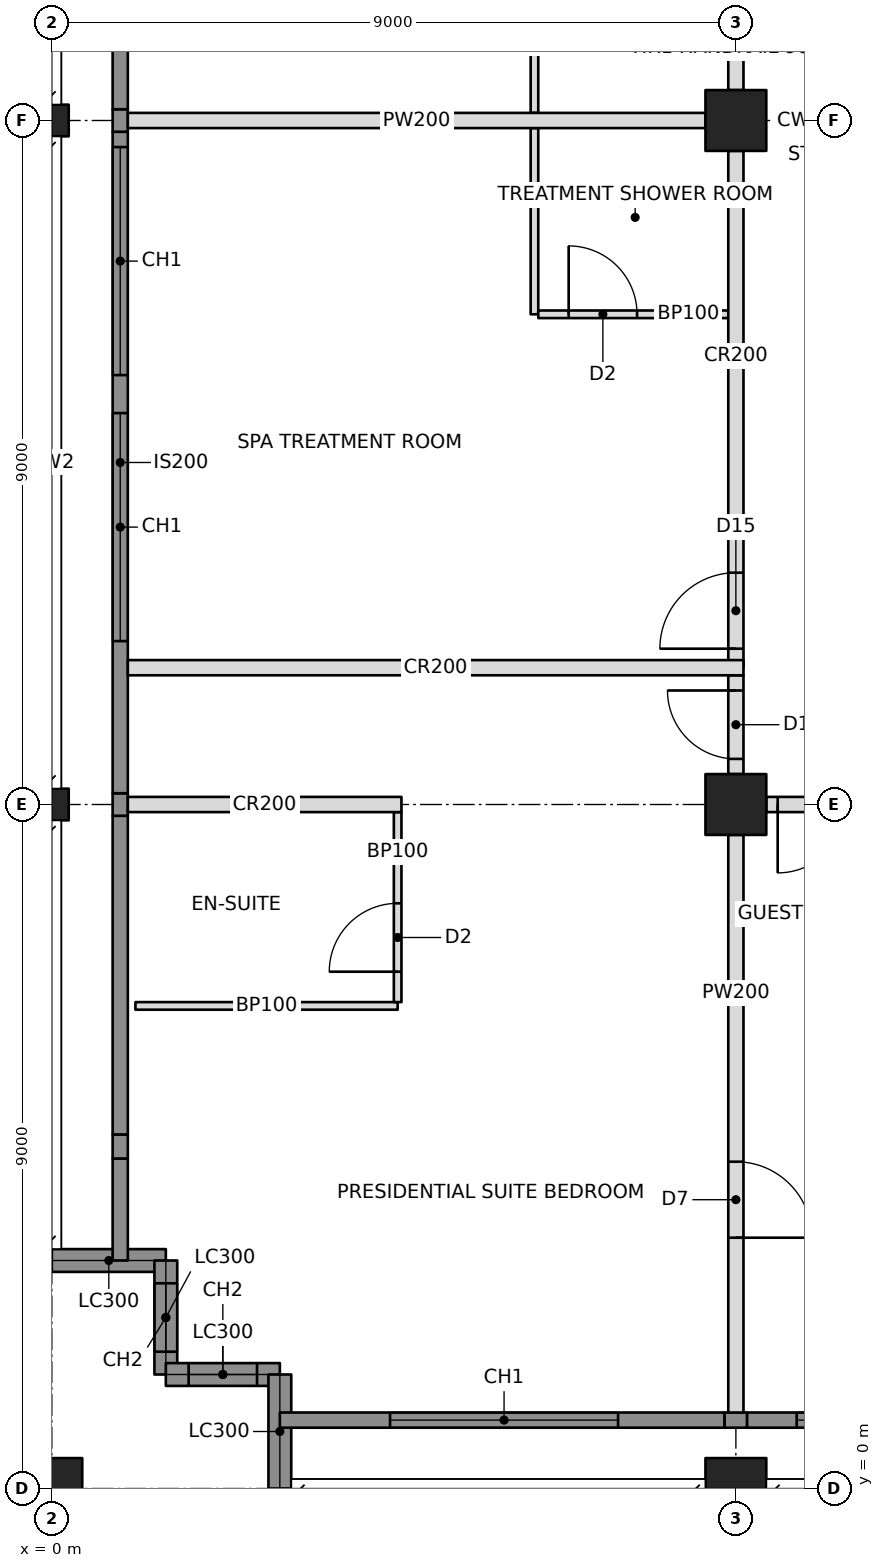
"""IFC4 building model, lengths in metres.
Left out: names, types, materials, properties, quantities, classifications, styles, units other than length and angle.
Written with IfcOpenShell. Run it as: python <this file> out.ifc"""

import sys

from ifc_helpers import new_model, si_unit, direction, frame, frame_2d, origin, origin_with_axes, origin_2d, place, context, subcontext, project, spatial, rectangle, hollow_rectangle, i_section, extrude, element, fill, save


model = new_model("IFC4")
c1 = context("Model", 3, precision=1e-05, world=origin(), true_north=direction((0.0, 1.0)))
c2 = subcontext(c1, "Body", "Model", "MODEL_VIEW")
j1 = project(units=[si_unit("LENGTHUNIT", "METRE"), si_unit("PLANEANGLEUNIT", "RADIAN")], contexts=[c1])
p1 = place(None, origin())
s1 = spatial("IfcSite", under=j1, at=p1, CompositionType="ELEMENT")
p2 = place(p1, origin())
s2 = spatial("IfcBuilding", under=s1, at=p2, CompositionType="ELEMENT")
p3 = place(p2, frame((0.0, 0.0, 266.2)))
s3 = spatial("IfcBuildingStorey", under=s2, at=p3, CompositionType="ELEMENT", Elevation=266.2)
p4 = place(p3, origin_with_axes())
e1 = element("IfcColumn", 1, at=p4, inside=s3, PredefinedType="COLUMN", context=c2, shape_type="SweptSolid", body=[
    extrude(hollow_rectangle(XDim=0.8, YDim=0.8, WallThickness=0.032, at=origin_2d()), origin(), (0.0, 0.0, 1.0), 3.6),
])
for number, where, z_axis, x_axis in (
    (2, (0.0, 9.0, 0.0), (0.0, 0.0, 1.0), (0.0, 1.0, 0.0)),
    (3, (0.0, 18.0, 0.0), (0.0, 0.0, 1.0), (0.0, 1.0, 0.0)),
):
    element("IfcColumn", number, at=place(p3, frame(where, z_axis=z_axis, x_axis=x_axis)), inside=s3, PredefinedType="COLUMN", context=c2, shape_type="SweptSolid", body=[
        extrude(i_section(OverallWidth=0.417, OverallDepth=0.445, WebThickness=0.039, FlangeThickness=0.063, at=origin_2d()), origin(), (0.0, 0.0, 1.0), 3.6),
    ])
for number, where, z_axis, x_axis in (
    (4, (9.0, 0.0, 0.0), (0.0, 0.0, 1.0), (1.0, 0.0, 0.0)),
    (5, (9.0, 9.0, 0.0), (0.0, 0.0, 1.0), (1.0, 0.0, 0.0)),
    (6, (9.0, 18.0, 0.0), (0.0, 0.0, 1.0), (1.0, 0.0, 0.0)),
):
    element("IfcColumn", number, at=place(p3, frame(where, z_axis=z_axis, x_axis=x_axis)), inside=s3, PredefinedType="COLUMN", context=c2, shape_type="SweptSolid", body=[
        extrude(hollow_rectangle(XDim=0.8, YDim=0.8, WallThickness=0.032, at=origin_2d()), origin(), (0.0, 0.0, 1.0), 3.6),
    ])
p5 = place(p3, frame((0.0, 3.0, 0.0), z_axis=(0.0, 0.0, 1.0), x_axis=(1.0, 0.0, 0.0)))
e7 = element("IfcWall", 7, at=p5, inside=s3, PredefinedType="SOLIDWALL", context=c2, shape_type="SweptSolid", body=[
    extrude(rectangle(XDim=1.5, YDim=0.3, at=frame_2d((0.75, 0.0))), origin(), (0.0, 0.0, 1.0), 2.57),
])
p6 = place(p3, frame((1.5, 3.0, 0.0), z_axis=(0.0, 0.0, 1.0), x_axis=(0.0, -1.0, 0.0)))
e8 = element("IfcWall", 8, at=p6, inside=s3, PredefinedType="SOLIDWALL", context=c2, shape_type="SweptSolid", body=[
    extrude(rectangle(XDim=1.5, YDim=0.3, at=frame_2d((0.75, 0.0))), origin(), (0.0, 0.0, 1.0), 3.35),
])
p7 = place(p6, frame((0.3, 0.0, 0.6)))
e9 = element("IfcOpeningElement", 9, at=p7, cuts=e8, PredefinedType="OPENING", context=c2, shape_type="SweptSolid", body=[
    extrude(rectangle(XDim=0.9, YDim=2.2, at=frame_2d((0.45, 1.1))), frame((0.0, 0.16, 0.0), z_axis=(0.0, -1.0, 0.0), x_axis=(1.0, 0.0, 0.0)), (0.0, 0.0, 1.0), 0.32),
])
p8 = place(p3, frame((1.5, 1.5, 0.0), z_axis=(0.0, 0.0, 1.0), x_axis=(1.0, 0.0, 0.0)))
e10 = element("IfcWall", 10, at=p8, inside=s3, PredefinedType="SOLIDWALL", context=c2, shape_type="SweptSolid", body=[
    extrude(rectangle(XDim=1.5, YDim=0.3, at=frame_2d((0.75, 0.0))), origin(), (0.0, 0.0, 1.0), 3.35),
])
p9 = place(p8, frame((0.3, 0.0, 0.6)))
e11 = element("IfcOpeningElement", 11, at=p9, cuts=e10, PredefinedType="OPENING", context=c2, shape_type="SweptSolid", body=[
    extrude(rectangle(XDim=0.9, YDim=2.2, at=frame_2d((0.45, 1.1))), frame((0.0, 0.16, 0.0), z_axis=(0.0, -1.0, 0.0), x_axis=(1.0, 0.0, 0.0)), (0.0, 0.0, 1.0), 0.32),
])
p10 = place(p3, frame((3.0, 1.5, 0.0), z_axis=(0.0, 0.0, 1.0), x_axis=(0.0, -1.0, 0.0)))
e12 = element("IfcWall", 12, at=p10, inside=s3, PredefinedType="SOLIDWALL", context=c2, shape_type="SweptSolid", body=[
    extrude(rectangle(XDim=1.5, YDim=0.3, at=frame_2d((0.75, 0.0))), origin(), (0.0, 0.0, 1.0), 2.57),
])
p11 = place(p3, frame((3.0, 0.9, 0.0), z_axis=(0.0, 0.0, 1.0), x_axis=(1.0, 0.0, 0.0)))
e13 = element("IfcWall", 13, at=p11, inside=s3, PredefinedType="SOLIDWALL", context=c2, shape_type="SweptSolid", body=[
    extrude(rectangle(XDim=5.852, YDim=0.2, at=frame_2d((2.926, 0.0))), origin(), (0.0, 0.0, 1.0), 3.35),
])
p12 = place(p11, frame((1.45, 0.0, 0.6)))
e14 = element("IfcOpeningElement", 14, at=p12, cuts=e13, PredefinedType="OPENING", context=c2, shape_type="SweptSolid", body=[
    extrude(rectangle(XDim=3.0, YDim=2.2, at=frame_2d((1.5, 1.1))), frame((0.0, 0.11, 0.0), z_axis=(0.0, -1.0, 0.0), x_axis=(1.0, 0.0, 0.0)), (0.0, 0.0, 1.0), 0.22),
])
p13 = place(p3, frame((0.9, 3.0, 0.0), z_axis=(0.0, 0.0, 1.0), x_axis=(0.0, 1.0, 0.0)))
e15 = element("IfcWall", 15, at=p13, inside=s3, PredefinedType="SOLIDWALL", context=c2, shape_type="SweptSolid", body=[
    extrude(rectangle(XDim=1.342, YDim=0.2, at=frame_2d((0.671, 0.0))), origin(), (0.0, 0.0, 1.0), 3.35),
])
p14 = place(p3, frame((1.0, 9.0, 0.0), z_axis=(0.0, 0.0, 1.0), x_axis=(1.0, 0.0, 0.0)))
e16 = element("IfcWall", 16, at=p14, inside=s3, PredefinedType="PARTITIONING", context=c2, shape_type="SweptSolid", body=[
    extrude(rectangle(XDim=3.6, YDim=0.2, at=frame_2d((1.8, 0.0))), origin(), (0.0, 0.0, 1.0), 2.491),
])
p15 = place(p3, frame((9.4, 9.0, 0.0), z_axis=(0.0, 0.0, 1.0), x_axis=(1.0, 0.0, 0.0)))
e17 = element("IfcWall", 17, at=p15, inside=s3, PredefinedType="PARTITIONING", context=c2, shape_type="SweptSolid", body=[
    extrude(rectangle(XDim=8.2, YDim=0.2, at=frame_2d((4.1, 0.0))), origin(), (0.0, 0.0, 1.0), 2.491),
])
p16 = place(p15, frame((0.15, 0.0, 0.0)))
e18 = element("IfcOpeningElement", 18, at=p16, cuts=e17, PredefinedType="OPENING", context=c2, shape_type="SweptSolid", body=[
    extrude(rectangle(XDim=0.9, YDim=2.1, at=frame_2d((0.45, 1.05))), frame((0.0, 0.11, 0.0), z_axis=(0.0, -1.0, 0.0), x_axis=(1.0, 0.0, 0.0)), (0.0, 0.0, 1.0), 0.22),
])
p17 = place(p3, frame((9.0, 10.8, 0.0), z_axis=(0.0, 0.0, 1.0), x_axis=(0.0, 1.0, 0.0)))
e19 = element("IfcWall", 19, at=p17, inside=s3, PredefinedType="PARTITIONING", context=c2, shape_type="SweptSolid", body=[
    extrude(rectangle(XDim=6.8, YDim=0.2, at=frame_2d((3.4, 0.0))), origin(), (0.0, 0.0, 1.0), 2.491),
])
p18 = place(p17, frame((0.25, 0.0, 0.0)))
e20 = element("IfcOpeningElement", 20, at=p18, cuts=e19, PredefinedType="OPENING", context=c2, shape_type="SweptSolid", body=[
    extrude(rectangle(XDim=1.0, YDim=2.1, at=frame_2d((0.5, 1.05))), frame((0.0, 0.11, 0.0), z_axis=(0.0, -1.0, 0.0), x_axis=(1.0, 0.0, 0.0)), (0.0, 0.0, 1.0), 0.22),
])
p19 = place(p3, frame((9.0, 18.4, 0.0), z_axis=(0.0, 0.0, 1.0), x_axis=(0.0, 1.0, 0.0)))
e21 = element("IfcWall", 21, at=p19, inside=s3, PredefinedType="PARTITIONING", context=c2, shape_type="SweptSolid", body=[
    extrude(rectangle(XDim=8.2, YDim=0.2, at=frame_2d((4.1, 0.0))), origin(), (0.0, 0.0, 1.0), 2.491),
])
p20 = place(p19, frame((5.55, 0.0, 0.0)))
e22 = element("IfcOpeningElement", 22, at=p20, cuts=e21, PredefinedType="OPENING", context=c2, shape_type="SweptSolid", body=[
    extrude(rectangle(XDim=1.0, YDim=2.1, at=frame_2d((0.5, 1.05))), frame((0.0, 0.11, 0.0), z_axis=(0.0, -1.0, 0.0), x_axis=(1.0, 0.0, 0.0)), (0.0, 0.0, 1.0), 0.22),
])
p21 = place(p3, frame((1.0, 10.8, 0.0), z_axis=(0.0, 0.0, 1.0), x_axis=(1.0, 0.0, 0.0)))
e23 = element("IfcWall", 23, at=p21, inside=s3, PredefinedType="PARTITIONING", context=c2, shape_type="SweptSolid", body=[
    extrude(rectangle(XDim=8.1, YDim=0.2, at=frame_2d((4.05, 0.0))), origin(), (0.0, 0.0, 1.0), 2.491),
])
p22 = place(p3, frame((9.0, 8.6, 0.0), z_axis=(0.0, 0.0, 1.0), x_axis=(0.0, -1.0, 0.0)))
e24 = element("IfcWall", 24, at=p22, inside=s3, PredefinedType="PARTITIONING", context=c2, shape_type="SweptSolid", body=[
    extrude(rectangle(XDim=7.6, YDim=0.2, at=frame_2d((3.8, 0.0))), origin(), (0.0, 0.0, 1.0), 2.491),
])
p23 = place(p22, frame((4.3, 0.0, 0.0)))
e25 = element("IfcOpeningElement", 25, at=p23, cuts=e24, PredefinedType="OPENING", context=c2, shape_type="SweptSolid", body=[
    extrude(rectangle(XDim=1.0, YDim=2.1, at=frame_2d((0.5, 1.05))), frame((0.0, 0.11, 0.0), z_axis=(0.0, -1.0, 0.0), x_axis=(1.0, 0.0, 0.0)), (0.0, 0.0, 1.0), 0.22),
])
p24 = place(p3, frame((1.1, 6.35, 0.0), z_axis=(0.0, 0.0, 1.0), x_axis=(1.0, 0.0, 0.0)))
e26 = element("IfcWall", 26, at=p24, inside=s3, PredefinedType="PARTITIONING", context=c2, shape_type="SweptSolid", body=[
    extrude(rectangle(XDim=3.45, YDim=0.1, at=frame_2d((1.725, 0.0))), origin(), (0.0, 0.0, 1.0), 3.35),
])
p25 = place(p3, frame((4.55, 8.9, 0.0), z_axis=(0.0, 0.0, 1.0), x_axis=(0.0, -1.0, 0.0)))
e27 = element("IfcWall", 27, at=p25, inside=s3, PredefinedType="PARTITIONING", context=c2, shape_type="SweptSolid", body=[
    extrude(rectangle(XDim=2.5, YDim=0.1, at=frame_2d((1.25, 0.0))), origin(), (0.0, 0.0, 1.0), 2.491),
])
p26 = place(p25, frame((1.2, 0.0, 0.0)))
e28 = element("IfcOpeningElement", 28, at=p26, cuts=e27, PredefinedType="OPENING", context=c2, shape_type="SweptSolid", body=[
    extrude(rectangle(XDim=0.9, YDim=2.1, at=frame_2d((0.45, 1.05))), frame((0.0, 0.06, 0.0), z_axis=(0.0, -1.0, 0.0), x_axis=(1.0, 0.0, 0.0)), (0.0, 0.0, 1.0), 0.12),
])
p27 = place(p3, frame((8.6, 18.0, 0.0), z_axis=(0.0, 0.0, 1.0), x_axis=(-1.0, 0.0, 0.0)))
e29 = element("IfcWall", 29, at=p27, inside=s3, PredefinedType="PARTITIONING", context=c2, shape_type="SweptSolid", body=[
    extrude(rectangle(XDim=7.6, YDim=0.2, at=frame_2d((3.8, 0.0))), origin(), (0.0, 0.0, 1.0), 2.491),
])
p28 = place(p3, frame((6.35, 15.45, 0.0), z_axis=(0.0, 0.0, 1.0), x_axis=(0.0, 1.0, 0.0)))
e30 = element("IfcWall", 30, at=p28, inside=s3, PredefinedType="PARTITIONING", context=c2, shape_type="SweptSolid", body=[
    extrude(rectangle(XDim=2.45, YDim=0.1, at=frame_2d((1.225, 0.0))), origin(), (0.0, 0.0, 1.0), 2.491),
])
p29 = place(p3, frame((8.9, 15.45, 0.0), z_axis=(0.0, 0.0, 1.0), x_axis=(-1.0, 0.0, 0.0)))
e31 = element("IfcWall", 31, at=p29, inside=s3, PredefinedType="PARTITIONING", context=c2, shape_type="SweptSolid", body=[
    extrude(rectangle(XDim=2.5, YDim=0.1, at=frame_2d((1.25, 0.0))), origin(), (0.0, 0.0, 1.0), 2.491),
])
p30 = place(p29, frame((1.2, 0.0, 0.0)))
e32 = element("IfcOpeningElement", 32, at=p30, cuts=e31, PredefinedType="OPENING", context=c2, shape_type="SweptSolid", body=[
    extrude(rectangle(XDim=0.9, YDim=2.1, at=frame_2d((0.45, 1.05))), frame((0.0, 0.06, 0.0), z_axis=(0.0, -1.0, 0.0), x_axis=(1.0, 0.0, 0.0)), (0.0, 0.0, 1.0), 0.12),
])
p31 = place(p3, frame((6.35, 18.1, 0.0), z_axis=(0.0, 0.0, 1.0), x_axis=(0.0, 1.0, 0.0)))
e33 = element("IfcWall", 33, at=p31, inside=s3, PredefinedType="PARTITIONING", context=c2, shape_type="SweptSolid", body=[
    extrude(rectangle(XDim=2.45, YDim=0.1, at=frame_2d((1.225, 0.0))), origin(), (0.0, 0.0, 1.0), 2.491),
])
p32 = place(p3, frame((9.0, 9.4, 0.0), z_axis=(0.0, 0.0, 1.0), x_axis=(0.0, 1.0, 0.0)))
e34 = element("IfcWall", 34, at=p32, inside=s3, PredefinedType="PARTITIONING", context=c2, shape_type="SweptSolid", body=[
    extrude(rectangle(XDim=1.3, YDim=0.2, at=frame_2d((0.65, 0.0))), origin(), (0.0, 0.0, 1.0), 2.491),
])
p33 = place(p32, frame((0.2, 0.0, 0.0)))
e35 = element("IfcOpeningElement", 35, at=p33, cuts=e34, PredefinedType="OPENING", context=c2, shape_type="SweptSolid", body=[
    extrude(rectangle(XDim=0.9, YDim=2.1, at=frame_2d((0.45, 1.05))), frame((0.0, 0.11, 0.0), z_axis=(0.0, -1.0, 0.0), x_axis=(1.0, 0.0, 0.0)), (0.0, 0.0, 1.0), 0.22),
])
p34 = place(p3, frame((8.852, 0.9, 0.0), z_axis=(0.0, 0.0, 1.0), x_axis=(1.0, 0.0, 0.0)))
e36 = element("IfcWall", 36, at=p34, inside=s3, PredefinedType="SOLIDWALL", context=c2, shape_type="SweptSolid", body=[
    extrude(rectangle(XDim=0.296, YDim=0.2, at=frame_2d((0.148, 0.0))), origin(), (0.0, 0.0, 1.0), 2.491),
])
p35 = place(p3, frame((9.148, 0.9, 0.0), z_axis=(0.0, 0.0, 1.0), x_axis=(1.0, 0.0, 0.0)))
e37 = element("IfcWall", 37, at=p35, inside=s3, PredefinedType="SOLIDWALL", context=c2, shape_type="SweptSolid", body=[
    extrude(rectangle(XDim=8.704, YDim=0.2, at=frame_2d((4.352, 0.0))), origin(), (0.0, 0.0, 1.0), 3.35),
])
p36 = place(p35, frame((0.652, 0.0, 0.6)))
e38 = element("IfcOpeningElement", 38, at=p36, cuts=e37, PredefinedType="OPENING", context=c2, shape_type="SweptSolid", body=[
    extrude(rectangle(XDim=3.0, YDim=2.2, at=frame_2d((1.5, 1.1))), frame((0.0, 0.11, 0.0), z_axis=(0.0, -1.0, 0.0), x_axis=(1.0, 0.0, 0.0)), (0.0, 0.0, 1.0), 0.22),
])
p37 = place(p35, frame((5.052, 0.0, 0.6)))
e39 = element("IfcOpeningElement", 39, at=p37, cuts=e37, PredefinedType="OPENING", context=c2, shape_type="SweptSolid", body=[
    extrude(rectangle(XDim=3.0, YDim=2.2, at=frame_2d((1.5, 1.1))), frame((0.0, 0.11, 0.0), z_axis=(0.0, -1.0, 0.0), x_axis=(1.0, 0.0, 0.0)), (0.0, 0.0, 1.0), 0.22),
])
p38 = place(p3, frame((0.9, 4.342, 0.0), z_axis=(0.0, 0.0, 1.0), x_axis=(0.0, 1.0, 0.0)))
e40 = element("IfcWall", 40, at=p38, inside=s3, PredefinedType="SOLIDWALL", context=c2, shape_type="SweptSolid", body=[
    extrude(rectangle(XDim=0.316, YDim=0.2, at=frame_2d((0.158, 0.0))), origin(), (0.0, 0.0, 1.0), 2.806),
])
p39 = place(p3, frame((0.9, 4.658, 0.0), z_axis=(0.0, 0.0, 1.0), x_axis=(0.0, 1.0, 0.0)))
e41 = element("IfcWall", 41, at=p39, inside=s3, PredefinedType="SOLIDWALL", context=c2, shape_type="SweptSolid", body=[
    extrude(rectangle(XDim=4.194, YDim=0.2, at=frame_2d((2.097, 0.0))), origin(), (0.0, 0.0, 1.0), 3.35),
])
p40 = place(p3, frame((0.9, 8.852, 0.0), z_axis=(0.0, 0.0, 1.0), x_axis=(0.0, 1.0, 0.0)))
e42 = element("IfcWall", 42, at=p40, inside=s3, PredefinedType="SOLIDWALL", context=c2, shape_type="SweptSolid", body=[
    extrude(rectangle(XDim=0.296, YDim=0.2, at=frame_2d((0.148, 0.0))), origin(), (0.0, 0.0, 1.0), 2.491),
])
p41 = place(p3, frame((0.9, 9.148, 0.0), z_axis=(0.0, 0.0, 1.0), x_axis=(0.0, 1.0, 0.0)))
e43 = element("IfcWall", 43, at=p41, inside=s3, PredefinedType="SOLIDWALL", context=c2, shape_type="SweptSolid", body=[
    extrude(rectangle(XDim=8.704, YDim=0.2, at=frame_2d((4.352, 0.0))), origin(), (0.0, 0.0, 1.0), 3.35),
])
p42 = place(p41, frame((2.002, 0.0, 0.6)))
e44 = element("IfcOpeningElement", 44, at=p42, cuts=e43, PredefinedType="OPENING", context=c2, shape_type="SweptSolid", body=[
    extrude(rectangle(XDim=3.0, YDim=2.2, at=frame_2d((1.5, 1.1))), frame((0.0, 0.11, 0.0), z_axis=(0.0, -1.0, 0.0), x_axis=(1.0, 0.0, 0.0)), (0.0, 0.0, 1.0), 0.22),
])
p43 = place(p41, frame((5.502, 0.0, 0.6)))
e45 = element("IfcOpeningElement", 45, at=p43, cuts=e43, PredefinedType="OPENING", context=c2, shape_type="SweptSolid", body=[
    extrude(rectangle(XDim=3.0, YDim=2.2, at=frame_2d((1.5, 1.1))), frame((0.0, 0.11, 0.0), z_axis=(0.0, -1.0, 0.0), x_axis=(1.0, 0.0, 0.0)), (0.0, 0.0, 1.0), 0.22),
])
p44 = place(p3, frame((0.9, 17.852, 0.0), z_axis=(0.0, 0.0, 1.0), x_axis=(0.0, 1.0, 0.0)))
e46 = element("IfcWall", 46, at=p44, inside=s3, PredefinedType="SOLIDWALL", context=c2, shape_type="SweptSolid", body=[
    extrude(rectangle(XDim=0.296, YDim=0.2, at=frame_2d((0.148, 0.0))), origin(), (0.0, 0.0, 1.0), 2.491),
])
p45 = place(p3, frame((0.9, 18.148, 0.0), z_axis=(0.0, 0.0, 1.0), x_axis=(0.0, 1.0, 0.0)))
e47 = element("IfcWall", 47, at=p45, inside=s3, PredefinedType="SOLIDWALL", context=c2, shape_type="SweptSolid", body=[
    extrude(rectangle(XDim=5.852, YDim=0.2, at=frame_2d((2.926, 0.0))), origin(), (0.0, 0.0, 1.0), 3.35),
])
p46 = place(p45, frame((1.402, 0.0, 0.6)))
e48 = element("IfcOpeningElement", 48, at=p46, cuts=e47, PredefinedType="OPENING", context=c2, shape_type="SweptSolid", body=[
    extrude(rectangle(XDim=3.0, YDim=2.2, at=frame_2d((1.5, 1.1))), frame((0.0, 0.11, 0.0), z_axis=(0.0, -1.0, 0.0), x_axis=(1.0, 0.0, 0.0)), (0.0, 0.0, 1.0), 0.22),
])
p47 = place(p7, origin())
e49 = element("IfcWindow", 49, at=p47, inside=s3, PartitioningType="SINGLE_PANEL", PredefinedType="WINDOW", context=c2, shape_type="SweptSolid", body=[
    extrude(rectangle(XDim=0.9, YDim=2.2, at=frame_2d((0.45, 1.1))), frame((0.0, 0.03, 0.0), z_axis=(0.0, -1.0, 0.0), x_axis=(1.0, 0.0, 0.0)), (0.0, 0.0, 1.0), 0.06),
])
fill(e9, e49)
p48 = place(p9, origin())
e50 = element("IfcWindow", 50, at=p48, inside=s3, PartitioningType="SINGLE_PANEL", PredefinedType="WINDOW", context=c2, shape_type="SweptSolid", body=[
    extrude(rectangle(XDim=0.9, YDim=2.2, at=frame_2d((0.45, 1.1))), frame((0.0, 0.03, 0.0), z_axis=(0.0, -1.0, 0.0), x_axis=(1.0, 0.0, 0.0)), (0.0, 0.0, 1.0), 0.06),
])
fill(e11, e50)
p49 = place(p12, origin())
e51 = element("IfcWindow", 51, at=p49, inside=s3, PartitioningType="TRIPLE_PANEL_VERTICAL", PredefinedType="WINDOW", context=c2, shape_type="SweptSolid", body=[
    extrude(rectangle(XDim=3.0, YDim=2.2, at=frame_2d((1.5, 1.1))), frame((0.0, 0.03, 0.0), z_axis=(0.0, -1.0, 0.0), x_axis=(1.0, 0.0, 0.0)), (0.0, 0.0, 1.0), 0.06),
])
fill(e14, e51)
p50 = place(p36, origin())
e52 = element("IfcWindow", 52, at=p50, inside=s3, PartitioningType="TRIPLE_PANEL_VERTICAL", PredefinedType="WINDOW", context=c2, shape_type="SweptSolid", body=[
    extrude(rectangle(XDim=3.0, YDim=2.2, at=frame_2d((1.5, 1.1))), frame((0.0, 0.03, 0.0), z_axis=(0.0, -1.0, 0.0), x_axis=(1.0, 0.0, 0.0)), (0.0, 0.0, 1.0), 0.06),
])
fill(e38, e52)
p51 = place(p42, origin())
e53 = element("IfcWindow", 53, at=p51, inside=s3, PartitioningType="TRIPLE_PANEL_VERTICAL", PredefinedType="WINDOW", context=c2, shape_type="SweptSolid", body=[
    extrude(rectangle(XDim=3.0, YDim=2.2, at=frame_2d((1.5, 1.1))), frame((0.0, 0.03, 0.0), z_axis=(0.0, -1.0, 0.0), x_axis=(1.0, 0.0, 0.0)), (0.0, 0.0, 1.0), 0.06),
])
fill(e44, e53)
p52 = place(p43, origin())
e54 = element("IfcWindow", 54, at=p52, inside=s3, PartitioningType="TRIPLE_PANEL_VERTICAL", PredefinedType="WINDOW", context=c2, shape_type="SweptSolid", body=[
    extrude(rectangle(XDim=3.0, YDim=2.2, at=frame_2d((1.5, 1.1))), frame((0.0, 0.03, 0.0), z_axis=(0.0, -1.0, 0.0), x_axis=(1.0, 0.0, 0.0)), (0.0, 0.0, 1.0), 0.06),
])
fill(e45, e54)
p53 = place(p23, origin())
e55 = element("IfcDoor", 55, at=p53, inside=s3, OperationType="SINGLE_SWING_RIGHT", PredefinedType="DOOR", context=c2, shape_type="SweptSolid", body=[
    extrude(rectangle(XDim=1.0, YDim=2.1, at=frame_2d((0.5, 1.05))), frame((0.0, 0.025, 0.0), z_axis=(0.0, -1.0, 0.0), x_axis=(1.0, 0.0, 0.0)), (0.0, 0.0, 1.0), 0.05),
])
fill(e25, e55)
p54 = place(p26, frame((0.9, 0.0, 0.0), z_axis=(0.0, 0.0, 1.0), x_axis=(-1.0, 0.0, 0.0)))
e56 = element("IfcDoor", 56, at=p54, inside=s3, OperationType="SINGLE_SWING_LEFT", PredefinedType="DOOR", context=c2, shape_type="SweptSolid", body=[
    extrude(rectangle(XDim=0.9, YDim=2.1, at=frame_2d((0.45, 1.05))), frame((0.0, 0.025, 0.0), z_axis=(0.0, -1.0, 0.0), x_axis=(1.0, 0.0, 0.0)), (0.0, 0.0, 1.0), 0.05),
])
fill(e28, e56)
p55 = place(p16, frame((0.9, 0.0, 0.0), z_axis=(0.0, 0.0, 1.0), x_axis=(-1.0, 0.0, 0.0)))
e57 = element("IfcDoor", 57, at=p55, inside=s3, OperationType="SINGLE_SWING_RIGHT", PredefinedType="DOOR", context=c2, shape_type="SweptSolid", body=[
    extrude(rectangle(XDim=0.9, YDim=2.1, at=frame_2d((0.45, 1.05))), frame((0.0, 0.025, 0.0), z_axis=(0.0, -1.0, 0.0), x_axis=(1.0, 0.0, 0.0)), (0.0, 0.0, 1.0), 0.05),
])
fill(e18, e57)
p56 = place(p30, frame((0.9, 0.0, 0.0), z_axis=(0.0, 0.0, 1.0), x_axis=(-1.0, 0.0, 0.0)))
e58 = element("IfcDoor", 58, at=p56, inside=s3, OperationType="SINGLE_SWING_LEFT", PredefinedType="DOOR", context=c2, shape_type="SweptSolid", body=[
    extrude(rectangle(XDim=0.9, YDim=2.1, at=frame_2d((0.45, 1.05))), frame((0.0, 0.025, 0.0), z_axis=(0.0, -1.0, 0.0), x_axis=(1.0, 0.0, 0.0)), (0.0, 0.0, 1.0), 0.05),
])
fill(e32, e58)
p57 = place(p18, origin())
e59 = element("IfcDoor", 59, at=p57, inside=s3, OperationType="SINGLE_SWING_LEFT", PredefinedType="DOOR", context=c2, shape_type="SweptSolid", body=[
    extrude(rectangle(XDim=1.0, YDim=2.1, at=frame_2d((0.5, 1.05))), frame((0.0, 0.025, 0.0), z_axis=(0.0, -1.0, 0.0), x_axis=(1.0, 0.0, 0.0)), (0.0, 0.0, 1.0), 0.05),
])
fill(e20, e59)
p58 = place(p33, origin())
e60 = element("IfcDoor", 60, at=p58, inside=s3, OperationType="SINGLE_SWING_RIGHT", PredefinedType="DOOR", context=c2, shape_type="SweptSolid", body=[
    extrude(rectangle(XDim=0.9, YDim=2.1, at=frame_2d((0.45, 1.05))), frame((0.0, 0.025, 0.0), z_axis=(0.0, -1.0, 0.0), x_axis=(1.0, 0.0, 0.0)), (0.0, 0.0, 1.0), 0.05),
])
fill(e35, e60)
save(model, sys.argv[1])
